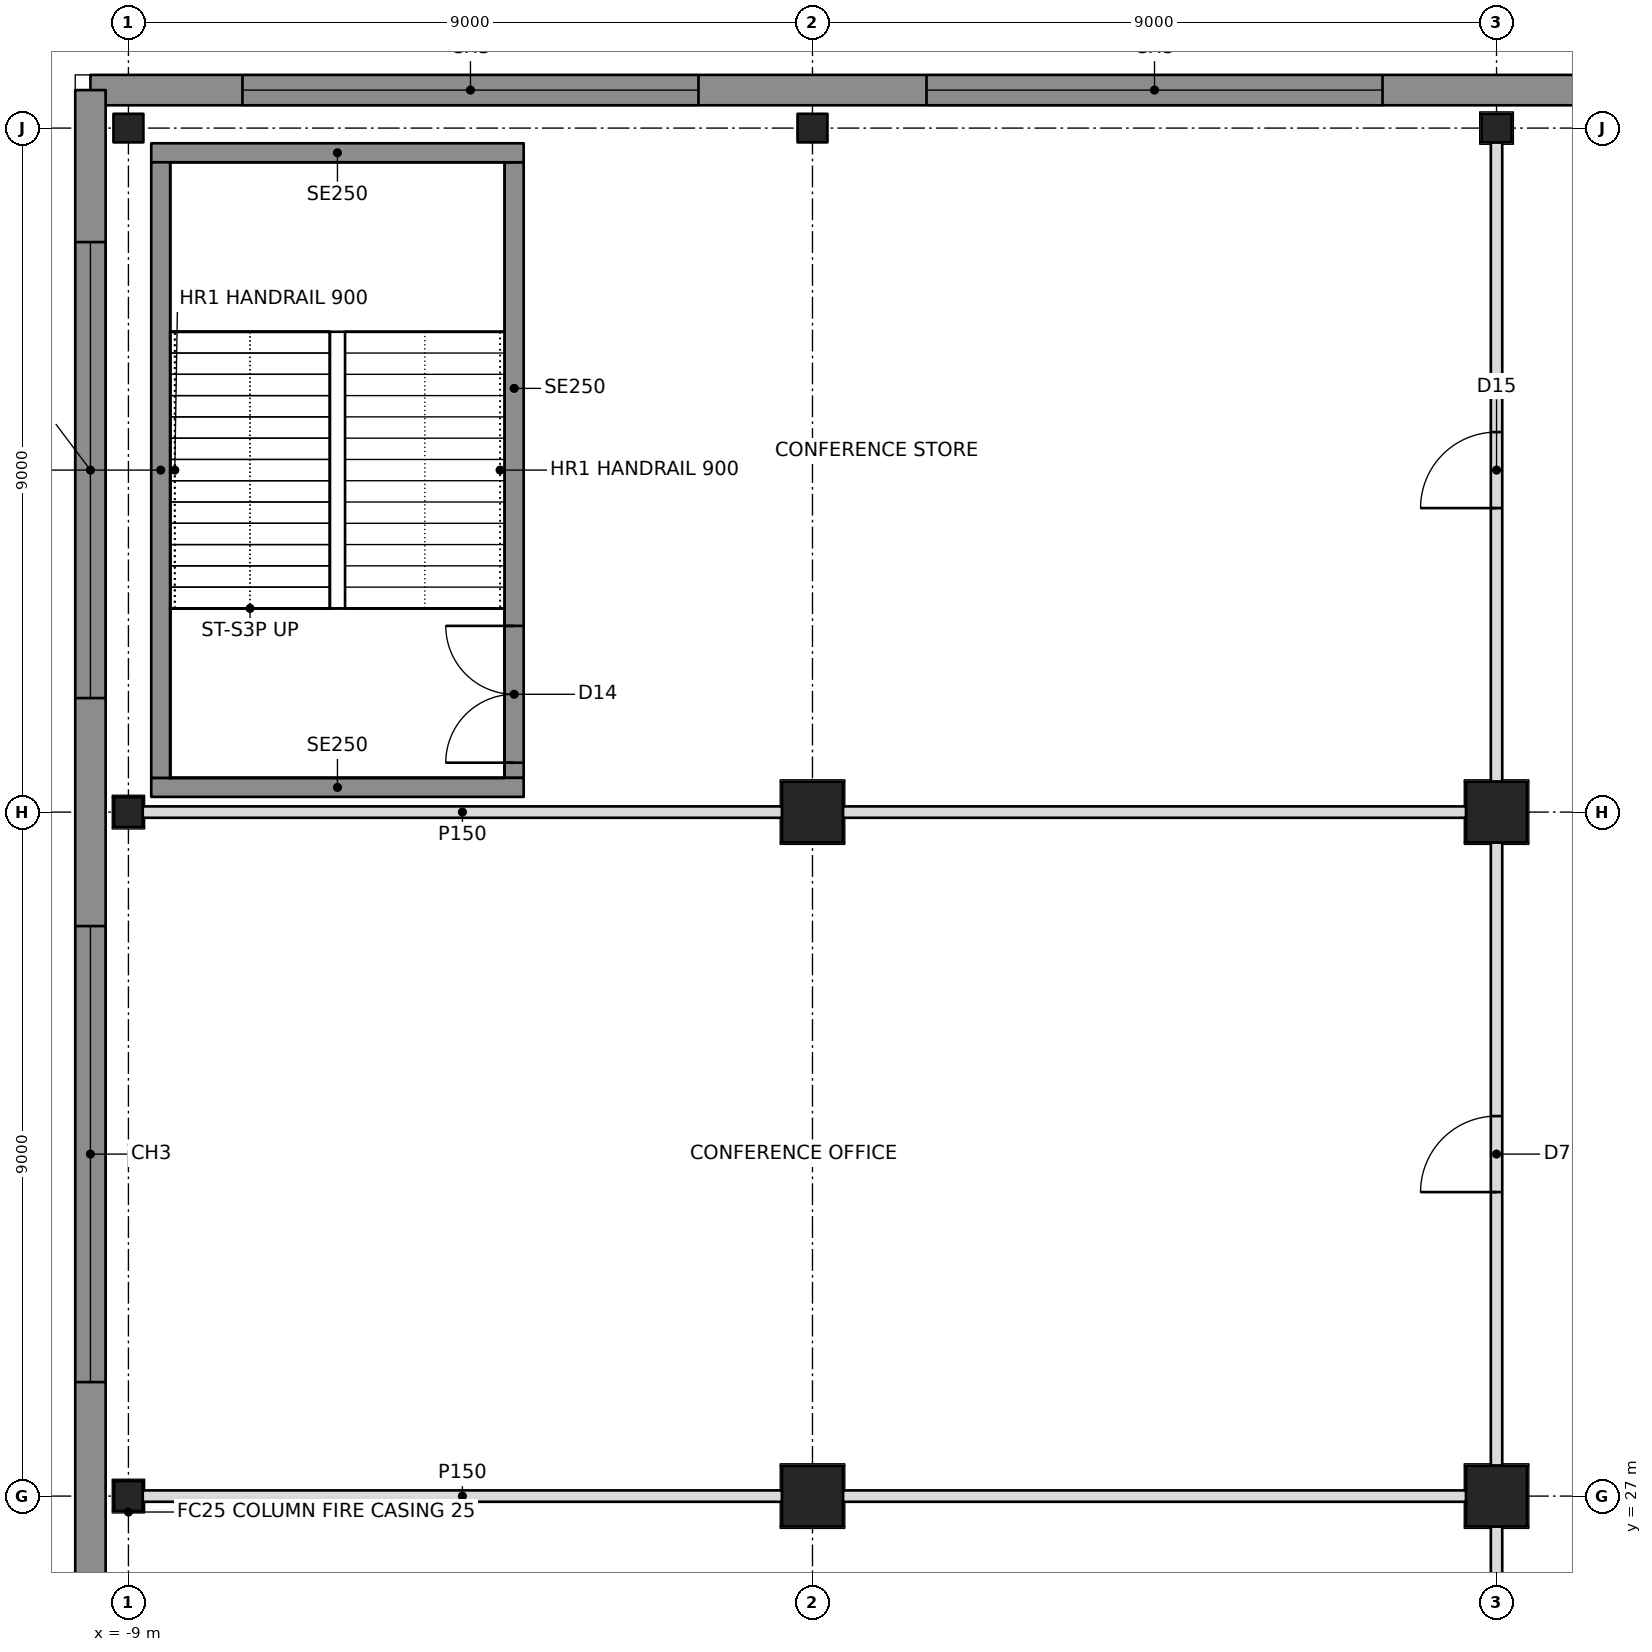
"""IFC4 building model, lengths in metres.
Left out: names, types, materials, properties, quantities, classifications, styles, units other than length and angle.
Written with IfcOpenShell. Run it as: python <this file> out.ifc"""

import sys

from ifc_helpers import new_model, si_unit, direction, frame, frame_2d, origin, origin_2d, place, context, subcontext, project, spatial, rectangle, hollow_rectangle, i_section, extrude, element, fill, save


model = new_model("IFC4")
c1 = context("Model", 3, precision=1e-05, world=origin(), true_north=direction((0.0, 1.0)))
c2 = subcontext(c1, "Body", "Model", "MODEL_VIEW")
j1 = project(units=[si_unit("LENGTHUNIT", "METRE"), si_unit("PLANEANGLEUNIT", "RADIAN")], contexts=[c1])
p1 = place(None, origin())
s1 = spatial("IfcSite", under=j1, at=p1, CompositionType="ELEMENT")
p2 = place(p1, origin())
s2 = spatial("IfcBuilding", under=s1, at=p2, CompositionType="ELEMENT")
p3 = place(p2, frame((0.0, 0.0, 11.0)))
s3 = spatial("IfcBuildingStorey", under=s2, at=p3, CompositionType="ELEMENT", Elevation=11.0)
for number, where, z_axis, x_axis in (
    (1, (-9.0, 27.0, 0.0), (0.0, 0.0, 1.0), (0.0, 1.0, 0.0)),
    (2, (-9.0, 36.0, 0.0), (0.0, 0.0, 1.0), (0.0, 1.0, 0.0)),
    (3, (-9.0, 45.0, 0.0), (0.0, 0.0, 1.0), (1.0, 0.0, 0.0)),
):
    element("IfcColumn", number, at=place(p3, frame(where, z_axis=z_axis, x_axis=x_axis)), inside=s3, PredefinedType="COLUMN", context=c2, shape_type="SweptSolid", body=[
        extrude(i_section(OverallWidth=0.394, OverallDepth=0.376, WebThickness=0.017, FlangeThickness=0.028, at=origin_2d()), origin(), (0.0, 0.0, 1.0), 5.0),
    ])
for number, where, z_axis, x_axis in (
    (4, (0.0, 27.0, 0.0), (0.0, 0.0, 1.0), (0.0, 1.0, 0.0)),
    (5, (0.0, 36.0, 0.0), (0.0, 0.0, 1.0), (1.0, 0.0, 0.0)),
):
    element("IfcColumn", number, at=place(p3, frame(where, z_axis=z_axis, x_axis=x_axis)), inside=s3, PredefinedType="COLUMN", context=c2, shape_type="SweptSolid", body=[
        extrude(hollow_rectangle(XDim=0.8, YDim=0.8, WallThickness=0.1, at=origin_2d()), origin(), (0.0, 0.0, 1.0), 5.0),
    ])
p4 = place(p3, frame((0.0, 45.0, 0.0), z_axis=(0.0, 0.0, 1.0), x_axis=(1.0, 0.0, 0.0)))
e6 = element("IfcColumn", 6, at=p4, inside=s3, PredefinedType="COLUMN", context=c2, shape_type="SweptSolid", body=[
    extrude(i_section(OverallWidth=0.394, OverallDepth=0.376, WebThickness=0.017, FlangeThickness=0.028, at=origin_2d()), origin(), (0.0, 0.0, 1.0), 5.0),
])
for number, where, z_axis, x_axis in (
    (7, (9.0, 27.0, 0.0), (0.0, 0.0, 1.0), (1.0, 0.0, 0.0)),
    (8, (9.0, 36.0, 0.0), (0.0, 0.0, 1.0), (1.0, 0.0, 0.0)),
):
    element("IfcColumn", number, at=place(p3, frame(where, z_axis=z_axis, x_axis=x_axis)), inside=s3, PredefinedType="COLUMN", context=c2, shape_type="SweptSolid", body=[
        extrude(hollow_rectangle(XDim=0.8, YDim=0.8, WallThickness=0.1, at=origin_2d()), origin(), (0.0, 0.0, 1.0), 5.0),
    ])
p5 = place(p3, frame((9.0, 45.0, 0.0), z_axis=(0.0, 0.0, 1.0), x_axis=(1.0, 0.0, 0.0)))
e9 = element("IfcColumn", 9, at=p5, inside=s3, PredefinedType="COLUMN", context=c2, shape_type="SweptSolid", body=[
    extrude(i_section(OverallWidth=0.394, OverallDepth=0.376, WebThickness=0.017, FlangeThickness=0.028, at=origin_2d()), origin(), (0.0, 0.0, 1.0), 5.0),
])
p6 = place(p3, frame((63.5, 45.5, 0.0), z_axis=(0.0, 0.0, 1.0), x_axis=(-1.0, 0.0, 0.0)))
e10 = element("IfcWall", 10, at=p6, inside=s3, PredefinedType="SOLIDWALL", context=c2, shape_type="SweptSolid", body=[
    extrude(rectangle(XDim=73.0, YDim=0.4, at=frame_2d((36.5, 0.0))), origin(), (0.0, 0.0, 1.0), 4.75),
])
p7 = place(p6, frame((2.0, 0.0, 0.9)))
e11 = element("IfcOpeningElement", 11, at=p7, cuts=e10, PredefinedType="OPENING", context=c2, shape_type="SweptSolid", body=[
    extrude(rectangle(XDim=6.0, YDim=2.6, at=frame_2d((3.0, 1.3))), frame((0.0, 0.21, 0.0), z_axis=(0.0, -1.0, 0.0), x_axis=(1.0, 0.0, 0.0)), (0.0, 0.0, 1.0), 0.42),
])
p8 = place(p6, frame((11.0, 0.0, 0.9)))
e12 = element("IfcOpeningElement", 12, at=p8, cuts=e10, PredefinedType="OPENING", context=c2, shape_type="SweptSolid", body=[
    extrude(rectangle(XDim=6.0, YDim=2.6, at=frame_2d((3.0, 1.3))), frame((0.0, 0.21, 0.0), z_axis=(0.0, -1.0, 0.0), x_axis=(1.0, 0.0, 0.0)), (0.0, 0.0, 1.0), 0.42),
])
p9 = place(p6, frame((20.0, 0.0, 0.9)))
e13 = element("IfcOpeningElement", 13, at=p9, cuts=e10, PredefinedType="OPENING", context=c2, shape_type="SweptSolid", body=[
    extrude(rectangle(XDim=6.0, YDim=2.6, at=frame_2d((3.0, 1.3))), frame((0.0, 0.21, 0.0), z_axis=(0.0, -1.0, 0.0), x_axis=(1.0, 0.0, 0.0)), (0.0, 0.0, 1.0), 0.42),
])
p10 = place(p6, frame((29.0, 0.0, 0.9)))
e14 = element("IfcOpeningElement", 14, at=p10, cuts=e10, PredefinedType="OPENING", context=c2, shape_type="SweptSolid", body=[
    extrude(rectangle(XDim=6.0, YDim=2.6, at=frame_2d((3.0, 1.3))), frame((0.0, 0.21, 0.0), z_axis=(0.0, -1.0, 0.0), x_axis=(1.0, 0.0, 0.0)), (0.0, 0.0, 1.0), 0.42),
])
p11 = place(p6, frame((38.0, 0.0, 0.9)))
e15 = element("IfcOpeningElement", 15, at=p11, cuts=e10, PredefinedType="OPENING", context=c2, shape_type="SweptSolid", body=[
    extrude(rectangle(XDim=6.0, YDim=2.6, at=frame_2d((3.0, 1.3))), frame((0.0, 0.21, 0.0), z_axis=(0.0, -1.0, 0.0), x_axis=(1.0, 0.0, 0.0)), (0.0, 0.0, 1.0), 0.42),
])
p12 = place(p6, frame((47.0, 0.0, 0.9)))
e16 = element("IfcOpeningElement", 16, at=p12, cuts=e10, PredefinedType="OPENING", context=c2, shape_type="SweptSolid", body=[
    extrude(rectangle(XDim=6.0, YDim=2.6, at=frame_2d((3.0, 1.3))), frame((0.0, 0.21, 0.0), z_axis=(0.0, -1.0, 0.0), x_axis=(1.0, 0.0, 0.0)), (0.0, 0.0, 1.0), 0.42),
])
p13 = place(p6, frame((56.0, 0.0, 0.9)))
e17 = element("IfcOpeningElement", 17, at=p13, cuts=e10, PredefinedType="OPENING", context=c2, shape_type="SweptSolid", body=[
    extrude(rectangle(XDim=6.0, YDim=2.6, at=frame_2d((3.0, 1.3))), frame((0.0, 0.21, 0.0), z_axis=(0.0, -1.0, 0.0), x_axis=(1.0, 0.0, 0.0)), (0.0, 0.0, 1.0), 0.42),
])
p14 = place(p6, frame((65.0, 0.0, 0.9)))
e18 = element("IfcOpeningElement", 18, at=p14, cuts=e10, PredefinedType="OPENING", context=c2, shape_type="SweptSolid", body=[
    extrude(rectangle(XDim=6.0, YDim=2.6, at=frame_2d((3.0, 1.3))), frame((0.0, 0.21, 0.0), z_axis=(0.0, -1.0, 0.0), x_axis=(1.0, 0.0, 0.0)), (0.0, 0.0, 1.0), 0.42),
])
p15 = place(p3, frame((-9.5, 45.5, 0.0), z_axis=(0.0, 0.0, 1.0), x_axis=(0.0, -1.0, 0.0)))
e19 = element("IfcWall", 19, at=p15, inside=s3, PredefinedType="SOLIDWALL", context=c2, shape_type="SweptSolid", body=[
    extrude(rectangle(XDim=73.0, YDim=0.4, at=frame_2d((36.5, 0.0))), origin(), (0.0, 0.0, 1.0), 4.75),
])
p16 = place(p15, frame((2.0, 0.0, 0.9)))
e20 = element("IfcOpeningElement", 20, at=p16, cuts=e19, PredefinedType="OPENING", context=c2, shape_type="SweptSolid", body=[
    extrude(rectangle(XDim=6.0, YDim=2.6, at=frame_2d((3.0, 1.3))), frame((0.0, 0.21, 0.0), z_axis=(0.0, -1.0, 0.0), x_axis=(1.0, 0.0, 0.0)), (0.0, 0.0, 1.0), 0.42),
])
p17 = place(p15, frame((11.0, 0.0, 0.9)))
e21 = element("IfcOpeningElement", 21, at=p17, cuts=e19, PredefinedType="OPENING", context=c2, shape_type="SweptSolid", body=[
    extrude(rectangle(XDim=6.0, YDim=2.6, at=frame_2d((3.0, 1.3))), frame((0.0, 0.21, 0.0), z_axis=(0.0, -1.0, 0.0), x_axis=(1.0, 0.0, 0.0)), (0.0, 0.0, 1.0), 0.42),
])
p18 = place(p15, frame((20.0, 0.0, 0.9)))
e22 = element("IfcOpeningElement", 22, at=p18, cuts=e19, PredefinedType="OPENING", context=c2, shape_type="SweptSolid", body=[
    extrude(rectangle(XDim=6.0, YDim=2.6, at=frame_2d((3.0, 1.3))), frame((0.0, 0.21, 0.0), z_axis=(0.0, -1.0, 0.0), x_axis=(1.0, 0.0, 0.0)), (0.0, 0.0, 1.0), 0.42),
])
p19 = place(p15, frame((29.0, 0.0, 0.9)))
e23 = element("IfcOpeningElement", 23, at=p19, cuts=e19, PredefinedType="OPENING", context=c2, shape_type="SweptSolid", body=[
    extrude(rectangle(XDim=6.0, YDim=2.6, at=frame_2d((3.0, 1.3))), frame((0.0, 0.21, 0.0), z_axis=(0.0, -1.0, 0.0), x_axis=(1.0, 0.0, 0.0)), (0.0, 0.0, 1.0), 0.42),
])
p20 = place(p15, frame((38.0, 0.0, 0.9)))
e24 = element("IfcOpeningElement", 24, at=p20, cuts=e19, PredefinedType="OPENING", context=c2, shape_type="SweptSolid", body=[
    extrude(rectangle(XDim=6.0, YDim=2.6, at=frame_2d((3.0, 1.3))), frame((0.0, 0.21, 0.0), z_axis=(0.0, -1.0, 0.0), x_axis=(1.0, 0.0, 0.0)), (0.0, 0.0, 1.0), 0.42),
])
p21 = place(p15, frame((47.0, 0.0, 0.9)))
e25 = element("IfcOpeningElement", 25, at=p21, cuts=e19, PredefinedType="OPENING", context=c2, shape_type="SweptSolid", body=[
    extrude(rectangle(XDim=6.0, YDim=2.6, at=frame_2d((3.0, 1.3))), frame((0.0, 0.21, 0.0), z_axis=(0.0, -1.0, 0.0), x_axis=(1.0, 0.0, 0.0)), (0.0, 0.0, 1.0), 0.42),
])
p22 = place(p15, frame((56.0, 0.0, 0.9)))
e26 = element("IfcOpeningElement", 26, at=p22, cuts=e19, PredefinedType="OPENING", context=c2, shape_type="SweptSolid", body=[
    extrude(rectangle(XDim=6.0, YDim=2.6, at=frame_2d((3.0, 1.3))), frame((0.0, 0.21, 0.0), z_axis=(0.0, -1.0, 0.0), x_axis=(1.0, 0.0, 0.0)), (0.0, 0.0, 1.0), 0.42),
])
p23 = place(p15, frame((65.0, 0.0, 0.9)))
e27 = element("IfcOpeningElement", 27, at=p23, cuts=e19, PredefinedType="OPENING", context=c2, shape_type="SweptSolid", body=[
    extrude(rectangle(XDim=6.0, YDim=2.6, at=frame_2d((3.0, 1.3))), frame((0.0, 0.21, 0.0), z_axis=(0.0, -1.0, 0.0), x_axis=(1.0, 0.0, 0.0)), (0.0, 0.0, 1.0), 0.42),
])
p24 = place(p3, frame((-8.812, 27.0, 0.0), z_axis=(0.0, 0.0, 1.0), x_axis=(1.0, 0.0, 0.0)))
e28 = element("IfcWall", 28, at=p24, inside=s3, PredefinedType="PARTITIONING", context=c2, shape_type="SweptSolid", body=[
    extrude(rectangle(XDim=8.412, YDim=0.15, at=frame_2d((4.206, 0.0))), origin(), (0.0, 0.0, 1.0), 3.892),
])
p25 = place(p3, frame((0.4, 27.0, 0.0), z_axis=(0.0, 0.0, 1.0), x_axis=(1.0, 0.0, 0.0)))
e29 = element("IfcWall", 29, at=p25, inside=s3, PredefinedType="PARTITIONING", context=c2, shape_type="SweptSolid", body=[
    extrude(rectangle(XDim=8.2, YDim=0.15, at=frame_2d((4.1, 0.0))), origin(), (0.0, 0.0, 1.0), 3.892),
])
p26 = place(p3, frame((-8.812, 36.0, 0.0), z_axis=(0.0, 0.0, 1.0), x_axis=(1.0, 0.0, 0.0)))
e30 = element("IfcWall", 30, at=p26, inside=s3, PredefinedType="PARTITIONING", context=c2, shape_type="SweptSolid", body=[
    extrude(rectangle(XDim=8.412, YDim=0.15, at=frame_2d((4.206, 0.0))), origin(), (0.0, 0.0, 1.0), 3.892),
])
for number, where, z_axis, x_axis in (
    (31, (0.4, 36.0, 0.0), (0.0, 0.0, 1.0), (1.0, 0.0, 0.0)),
    (32, (9.0, 26.6, 0.0), (0.0, 0.0, 1.0), (0.0, -1.0, 0.0)),
):
    element("IfcWall", number, at=place(p3, frame(where, z_axis=z_axis, x_axis=x_axis)), inside=s3, PredefinedType="PARTITIONING", context=c2, shape_type="SweptSolid", body=[
        extrude(rectangle(XDim=8.2, YDim=0.15, at=frame_2d((4.1, 0.0))), origin(), (0.0, 0.0, 1.0), 3.892),
    ])
p27 = place(p3, frame((9.0, 35.6, 0.0), z_axis=(0.0, 0.0, 1.0), x_axis=(0.0, -1.0, 0.0)))
e33 = element("IfcWall", 33, at=p27, inside=s3, PredefinedType="PARTITIONING", context=c2, shape_type="SweptSolid", body=[
    extrude(rectangle(XDim=8.2, YDim=0.15, at=frame_2d((4.1, 0.0))), origin(), (0.0, 0.0, 1.0), 3.892),
])
p28 = place(p27, frame((3.6, 0.0, 0.0)))
e34 = element("IfcOpeningElement", 34, at=p28, cuts=e33, PredefinedType="OPENING", context=c2, shape_type="SweptSolid", body=[
    extrude(rectangle(XDim=1.0, YDim=2.1, at=frame_2d((0.5, 1.05))), frame((0.0, 0.085, 0.0), z_axis=(0.0, -1.0, 0.0), x_axis=(1.0, 0.0, 0.0)), (0.0, 0.0, 1.0), 0.17),
])
p29 = place(p3, frame((9.0, 44.812, 0.0), z_axis=(0.0, 0.0, 1.0), x_axis=(0.0, -1.0, 0.0)))
e35 = element("IfcWall", 35, at=p29, inside=s3, PredefinedType="PARTITIONING", context=c2, shape_type="SweptSolid", body=[
    extrude(rectangle(XDim=8.412, YDim=0.15, at=frame_2d((4.206, 0.0))), origin(), (0.0, 0.0, 1.0), 3.892),
])
p30 = place(p29, frame((3.812, 0.0, 0.0)))
e36 = element("IfcOpeningElement", 36, at=p30, cuts=e35, PredefinedType="OPENING", context=c2, shape_type="SweptSolid", body=[
    extrude(rectangle(XDim=1.0, YDim=2.1, at=frame_2d((0.5, 1.05))), frame((0.0, 0.085, 0.0), z_axis=(0.0, -1.0, 0.0), x_axis=(1.0, 0.0, 0.0)), (0.0, 0.0, 1.0), 0.17),
])
for number, where, z_axis, x_axis in (
    (37, (-8.7, 36.325, 0.0), (0.0, 0.0, 1.0), (1.0, 0.0, 0.0)),
    (38, (-8.7, 44.675, 0.0), (0.0, 0.0, 1.0), (1.0, 0.0, 0.0)),
):
    element("IfcWall", number, at=place(p3, frame(where, z_axis=z_axis, x_axis=x_axis)), inside=s3, PredefinedType="SOLIDWALL", context=c2, shape_type="SweptSolid", body=[
        extrude(rectangle(XDim=4.9, YDim=0.25, at=frame_2d((2.45, 0.0))), origin(), (0.0, 0.0, 1.0), 4.75),
    ])
p31 = place(p3, frame((-8.575, 36.45, 0.0), z_axis=(0.0, 0.0, 1.0), x_axis=(0.0, 1.0, 0.0)))
e39 = element("IfcWall", 39, at=p31, inside=s3, PredefinedType="SOLIDWALL", context=c2, shape_type="SweptSolid", body=[
    extrude(rectangle(XDim=8.1, YDim=0.25, at=frame_2d((4.05, 0.0))), origin(), (0.0, 0.0, 1.0), 4.75),
])
p32 = place(p3, frame((-3.925, 36.45, 0.0), z_axis=(0.0, 0.0, 1.0), x_axis=(0.0, 1.0, 0.0)))
e40 = element("IfcWall", 40, at=p32, inside=s3, PredefinedType="SOLIDWALL", context=c2, shape_type="SweptSolid", body=[
    extrude(rectangle(XDim=8.1, YDim=0.25, at=frame_2d((4.05, 0.0))), origin(), (0.0, 0.0, 1.0), 4.75),
])
p33 = place(p32, frame((0.2, 0.0, 0.0)))
e41 = element("IfcOpeningElement", 41, at=p33, cuts=e40, PredefinedType="OPENING", context=c2, shape_type="SweptSolid", body=[
    extrude(rectangle(XDim=1.8, YDim=2.1, at=frame_2d((0.9, 1.05))), frame((0.0, 0.135, 0.0), z_axis=(0.0, -1.0, 0.0), x_axis=(1.0, 0.0, 0.0)), (0.0, 0.0, 1.0), 0.27),
])
p34 = place(p13, origin())
e42 = element("IfcWindow", 42, at=p34, inside=s3, PartitioningType="TRIPLE_PANEL_VERTICAL", PredefinedType="WINDOW", context=c2, shape_type="SweptSolid", body=[
    extrude(rectangle(XDim=6.0, YDim=2.6, at=frame_2d((3.0, 1.3))), frame((0.0, 0.03, 0.0), z_axis=(0.0, -1.0, 0.0), x_axis=(1.0, 0.0, 0.0)), (0.0, 0.0, 1.0), 0.06),
])
fill(e17, e42)
p35 = place(p14, origin())
e43 = element("IfcWindow", 43, at=p35, inside=s3, PartitioningType="TRIPLE_PANEL_VERTICAL", PredefinedType="WINDOW", context=c2, shape_type="SweptSolid", body=[
    extrude(rectangle(XDim=6.0, YDim=2.6, at=frame_2d((3.0, 1.3))), frame((0.0, 0.03, 0.0), z_axis=(0.0, -1.0, 0.0), x_axis=(1.0, 0.0, 0.0)), (0.0, 0.0, 1.0), 0.06),
])
fill(e18, e43)
p36 = place(p16, origin())
e44 = element("IfcWindow", 44, at=p36, inside=s3, PartitioningType="TRIPLE_PANEL_VERTICAL", PredefinedType="WINDOW", context=c2, shape_type="SweptSolid", body=[
    extrude(rectangle(XDim=6.0, YDim=2.6, at=frame_2d((3.0, 1.3))), frame((0.0, 0.03, 0.0), z_axis=(0.0, -1.0, 0.0), x_axis=(1.0, 0.0, 0.0)), (0.0, 0.0, 1.0), 0.06),
])
fill(e20, e44)
p37 = place(p17, origin())
e45 = element("IfcWindow", 45, at=p37, inside=s3, PartitioningType="TRIPLE_PANEL_VERTICAL", PredefinedType="WINDOW", context=c2, shape_type="SweptSolid", body=[
    extrude(rectangle(XDim=6.0, YDim=2.6, at=frame_2d((3.0, 1.3))), frame((0.0, 0.03, 0.0), z_axis=(0.0, -1.0, 0.0), x_axis=(1.0, 0.0, 0.0)), (0.0, 0.0, 1.0), 0.06),
])
fill(e21, e45)
p38 = place(p28, frame((1.0, 0.0, 0.0), z_axis=(0.0, 0.0, 1.0), x_axis=(-1.0, 0.0, 0.0)))
e46 = element("IfcDoor", 46, at=p38, inside=s3, OperationType="SINGLE_SWING_LEFT", PredefinedType="DOOR", context=c2, shape_type="SweptSolid", body=[
    extrude(rectangle(XDim=1.0, YDim=2.1, at=frame_2d((0.5, 1.05))), frame((0.0, 0.025, 0.0), z_axis=(0.0, -1.0, 0.0), x_axis=(1.0, 0.0, 0.0)), (0.0, 0.0, 1.0), 0.05),
])
fill(e34, e46)
p39 = place(p30, frame((1.0, 0.0, 0.0), z_axis=(0.0, 0.0, 1.0), x_axis=(-1.0, 0.0, 0.0)))
e47 = element("IfcDoor", 47, at=p39, inside=s3, OperationType="SINGLE_SWING_LEFT", PredefinedType="DOOR", context=c2, shape_type="SweptSolid", body=[
    extrude(rectangle(XDim=1.0, YDim=2.1, at=frame_2d((0.5, 1.05))), frame((0.0, 0.025, 0.0), z_axis=(0.0, -1.0, 0.0), x_axis=(1.0, 0.0, 0.0)), (0.0, 0.0, 1.0), 0.05),
])
fill(e36, e47)
p40 = place(p33, origin())
e48 = element("IfcDoor", 48, at=p40, inside=s3, OperationType="DOUBLE_DOOR_SINGLE_SWING", PredefinedType="DOOR", context=c2, shape_type="SweptSolid", body=[
    extrude(rectangle(XDim=1.8, YDim=2.1, at=frame_2d((0.9, 1.05))), frame((0.0, 0.025, 0.0), z_axis=(0.0, -1.0, 0.0), x_axis=(1.0, 0.0, 0.0)), (0.0, 0.0, 1.0), 0.05),
])
fill(e41, e48)
save(model, sys.argv[1])
